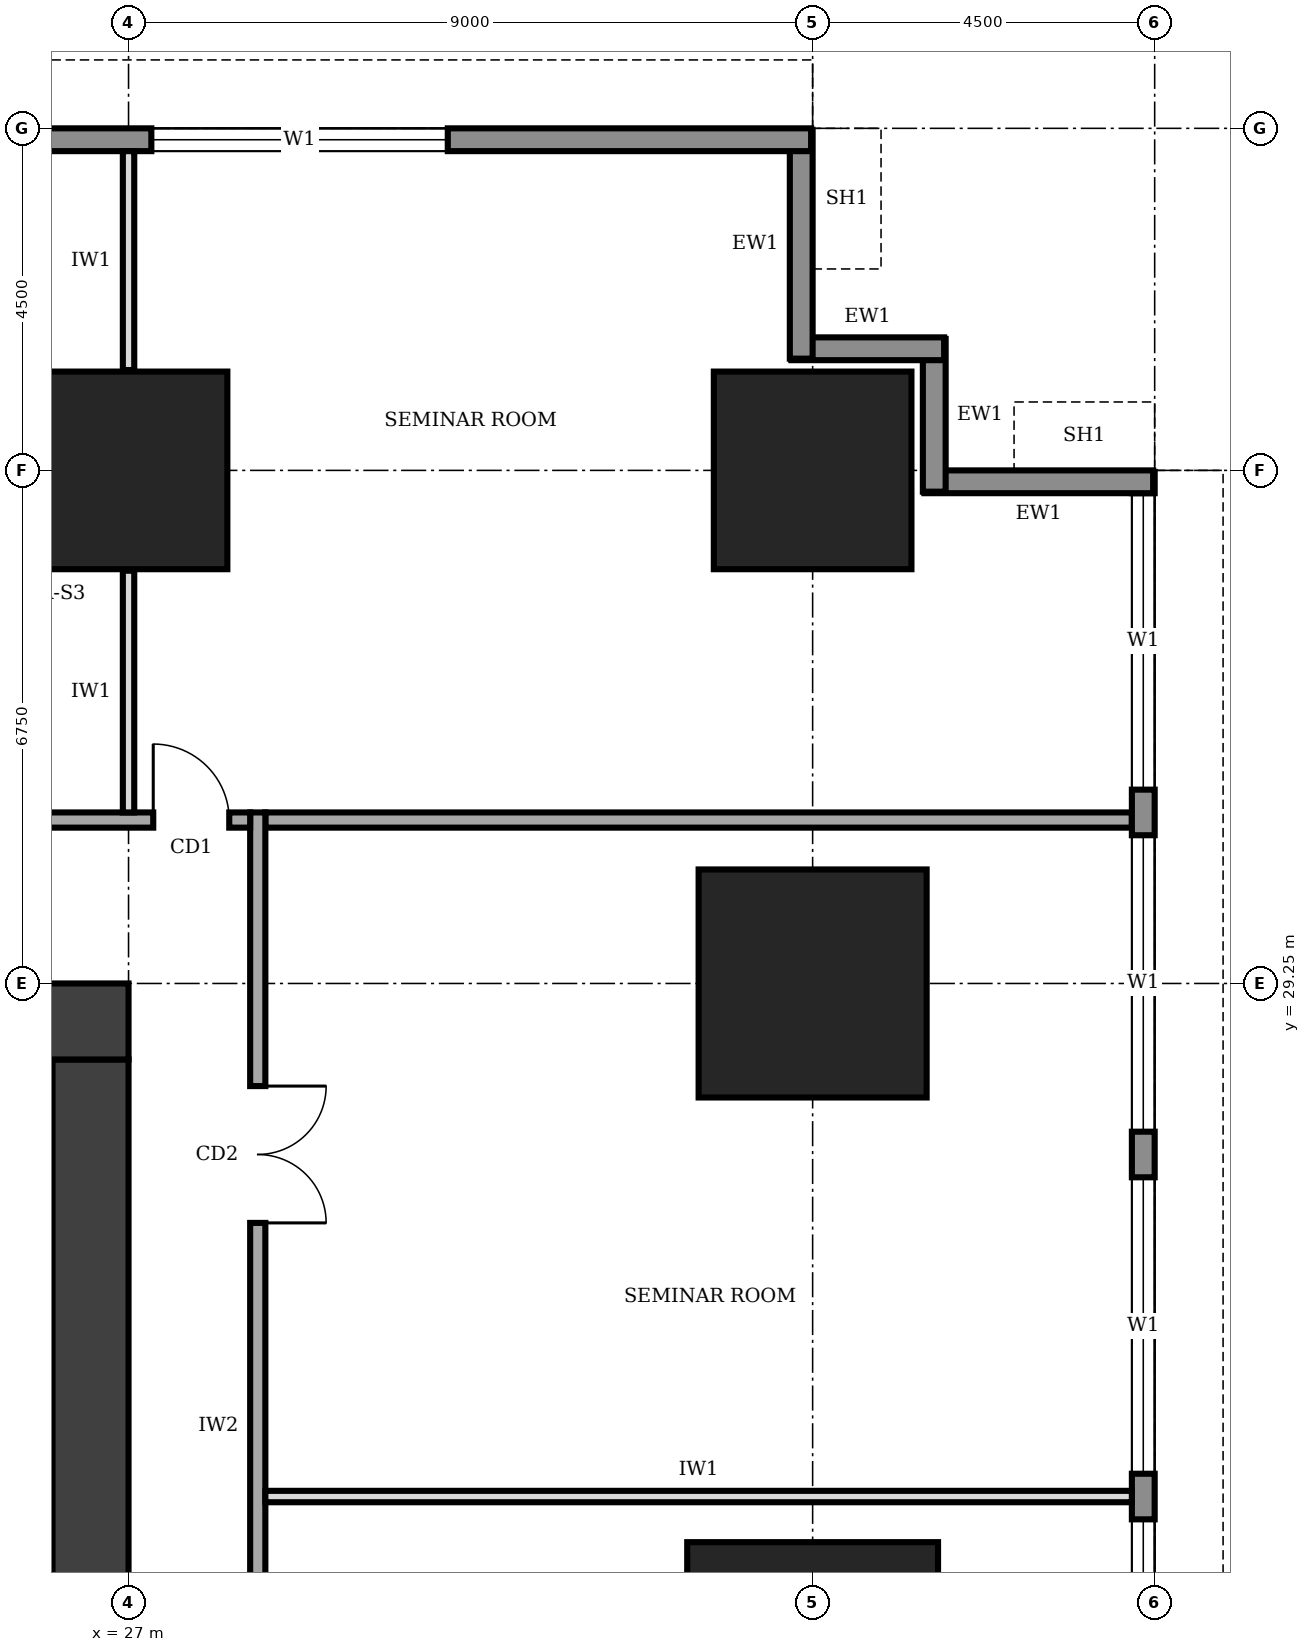
"""IFC4 building model, lengths in metres.
Left out: names, types, materials, properties, quantities, classifications, styles, units other than length and angle.
Written with IfcOpenShell. Run it as: python <this file> out.ifc"""

import sys

from ifc_helpers import new_model, si_unit, direction, frame, frame_2d, origin, origin_2d, place, context, subcontext, project, spatial, rectangle, extrude, element, fill, save


model = new_model("IFC4")
c1 = context("Model", 3, precision=1e-05, world=origin(), true_north=direction((0.0, 1.0)))
c2 = subcontext(c1, "Body", "Model", "MODEL_VIEW")
j1 = project(units=[si_unit("LENGTHUNIT", "METRE"), si_unit("PLANEANGLEUNIT", "RADIAN")], contexts=[c1])
p1 = place(None, origin())
s1 = spatial("IfcSite", under=j1, at=p1, CompositionType="ELEMENT")
p2 = place(p1, origin())
s2 = spatial("IfcBuilding", under=s1, at=p2, CompositionType="ELEMENT")
p3 = place(p2, frame((0.0, 0.0, 29.0)))
s3 = spatial("IfcBuildingStorey", under=s2, at=p3, CompositionType="ELEMENT", Elevation=29.0)
p4 = place(p3, frame((26.5, 12.25, 0.0), z_axis=(0.0, 0.0, 1.0), x_axis=(0.0, 1.0, 0.0)))
e1 = element("IfcWall", 1, at=p4, inside=s3, PredefinedType="SHEAR", context=c2, shape_type="SweptSolid", body=[
    extrude(rectangle(XDim=16.0, YDim=1.0, at=frame_2d((8.0, 0.0))), origin(), (0.0, 0.0, 1.0), 4.0),
])
p5 = place(p3, frame((27.0, 28.75, 0.0), z_axis=(0.0, 0.0, 1.0), x_axis=(-1.0, 0.0, 0.0)))
e2 = element("IfcWall", 2, at=p5, inside=s3, PredefinedType="SHEAR", context=c2, shape_type="SweptSolid", body=[
    extrude(rectangle(XDim=13.5, YDim=1.0, at=frame_2d((6.75, 0.0))), origin(), (0.0, 0.0, 1.0), 4.0),
])
p6 = place(p5, frame((4.75, 0.0, 0.0)))
e3 = element("IfcOpeningElement", 3, at=p6, cuts=e2, PredefinedType="OPENING", context=c2, shape_type="SweptSolid", body=[
    extrude(rectangle(XDim=1.8, YDim=2.1, at=frame_2d((0.9, 1.05))), frame((0.0, 0.51, 0.0), z_axis=(0.0, -1.0, 0.0), x_axis=(1.0, 0.0, 0.0)), (0.0, 0.0, 1.0), 1.02),
])
p7 = place(p3, frame((36.0, 20.25, 0.0), z_axis=(0.0, 0.0, 1.0), x_axis=(1.0, 0.0, 0.0)))
e4 = element("IfcColumn", 4, at=p7, inside=s3, PredefinedType="COLUMN", context=c2, shape_type="SweptSolid", body=[
    extrude(rectangle(XDim=3.3, YDim=3.3, at=origin_2d()), origin(), (0.0, 0.0, 1.0), 4.0),
])
p8 = place(p3, frame((36.0, 29.25, 0.0), z_axis=(0.0, 0.0, 1.0), x_axis=(1.0, 0.0, 0.0)))
e5 = element("IfcColumn", 5, at=p8, inside=s3, PredefinedType="COLUMN", context=c2, shape_type="SweptSolid", body=[
    extrude(rectangle(XDim=3.0, YDim=3.0, at=origin_2d()), origin(), (0.0, 0.0, 1.0), 4.0),
])
for number, where, z_axis, x_axis in (
    (6, (27.0, 36.0, 0.0), (0.0, 0.0, 1.0), (1.0, 0.0, 0.0)),
    (7, (36.0, 36.0, 0.0), (0.0, 0.0, 1.0), (1.0, 0.0, 0.0)),
):
    element("IfcColumn", number, at=place(p3, frame(where, z_axis=z_axis, x_axis=x_axis)), inside=s3, PredefinedType="COLUMN", context=c2, shape_type="SweptSolid", body=[
        extrude(rectangle(XDim=2.6, YDim=2.6, at=origin_2d()), origin(), (0.0, 0.0, 1.0), 4.0),
    ])
p9 = place(p3, frame((40.35, 4.52, 0.0), z_axis=(0.0, 0.0, 1.0), x_axis=(0.0, 1.0, 0.0)))
e8 = element("IfcWall", 8, at=p9, inside=s3, PredefinedType="STANDARD", context=c2, shape_type="SweptSolid", body=[
    extrude(rectangle(XDim=31.46, YDim=0.3, at=frame_2d((15.73, 0.0))), origin(), (0.0, 0.0, 1.0), 3.75),
])
p10 = place(p9, frame((4.78, 0.0, 0.9)))
e9 = element("IfcOpeningElement", 9, at=p10, cuts=e8, PredefinedType="OPENING", context=c2, shape_type="SweptSolid", body=[
    extrude(rectangle(XDim=3.9, YDim=2.2, at=frame_2d((1.95, 1.1))), frame((0.0, 0.16, 0.0), z_axis=(0.0, -1.0, 0.0), x_axis=(1.0, 0.0, 0.0)), (0.0, 0.0, 1.0), 0.32),
])
p11 = place(p9, frame((9.28, 0.0, 0.9)))
e10 = element("IfcOpeningElement", 10, at=p11, cuts=e8, PredefinedType="OPENING", context=c2, shape_type="SweptSolid", body=[
    extrude(rectangle(XDim=3.9, YDim=2.2, at=frame_2d((1.95, 1.1))), frame((0.0, 0.16, 0.0), z_axis=(0.0, -1.0, 0.0), x_axis=(1.0, 0.0, 0.0)), (0.0, 0.0, 1.0), 0.32),
])
p12 = place(p9, frame((13.78, 0.0, 0.9)))
e11 = element("IfcOpeningElement", 11, at=p12, cuts=e8, PredefinedType="OPENING", context=c2, shape_type="SweptSolid", body=[
    extrude(rectangle(XDim=3.9, YDim=2.2, at=frame_2d((1.95, 1.1))), frame((0.0, 0.16, 0.0), z_axis=(0.0, -1.0, 0.0), x_axis=(1.0, 0.0, 0.0)), (0.0, 0.0, 1.0), 0.32),
])
p13 = place(p9, frame((18.28, 0.0, 0.9)))
e12 = element("IfcOpeningElement", 12, at=p13, cuts=e8, PredefinedType="OPENING", context=c2, shape_type="SweptSolid", body=[
    extrude(rectangle(XDim=3.9, YDim=2.2, at=frame_2d((1.95, 1.1))), frame((0.0, 0.16, 0.0), z_axis=(0.0, -1.0, 0.0), x_axis=(1.0, 0.0, 0.0)), (0.0, 0.0, 1.0), 0.32),
])
p14 = place(p9, frame((22.78, 0.0, 0.9)))
e13 = element("IfcOpeningElement", 13, at=p14, cuts=e8, PredefinedType="OPENING", context=c2, shape_type="SweptSolid", body=[
    extrude(rectangle(XDim=3.9, YDim=2.2, at=frame_2d((1.95, 1.1))), frame((0.0, 0.16, 0.0), z_axis=(0.0, -1.0, 0.0), x_axis=(1.0, 0.0, 0.0)), (0.0, 0.0, 1.0), 0.32),
])
p15 = place(p9, frame((27.28, 0.0, 0.9)))
e14 = element("IfcOpeningElement", 14, at=p15, cuts=e8, PredefinedType="OPENING", context=c2, shape_type="SweptSolid", body=[
    extrude(rectangle(XDim=3.9, YDim=2.2, at=frame_2d((1.95, 1.1))), frame((0.0, 0.16, 0.0), z_axis=(0.0, -1.0, 0.0), x_axis=(1.0, 0.0, 0.0)), (0.0, 0.0, 1.0), 0.32),
])
p16 = place(p3, frame((40.48, 35.85, 0.0), z_axis=(0.0, 0.0, 1.0), x_axis=(-1.0, 0.0, 0.0)))
e15 = element("IfcWall", 15, at=p16, inside=s3, PredefinedType="STANDARD", context=c2, shape_type="SweptSolid", body=[
    extrude(rectangle(XDim=3.01, YDim=0.3, at=frame_2d((1.505, 0.0))), origin(), (0.0, 0.0, 1.0), 2.85),
])
for number, where, z_axis, x_axis in (
    (16, (37.6, 35.72, 0.0), (0.0, 0.0, 1.0), (0.0, 1.0, 0.0)),
    (17, (37.73, 37.6, 0.0), (0.0, 0.0, 1.0), (-1.0, 0.0, 0.0)),
):
    element("IfcWall", number, at=place(p3, frame(where, z_axis=z_axis, x_axis=x_axis)), inside=s3, PredefinedType="STANDARD", context=c2, shape_type="SweptSolid", body=[
        extrude(rectangle(XDim=2.01, YDim=0.3, at=frame_2d((1.005, 0.0))), origin(), (0.0, 0.0, 1.0), 3.75),
    ])
p17 = place(p3, frame((35.85, 37.47, 0.0), z_axis=(0.0, 0.0, 1.0), x_axis=(0.0, 1.0, 0.0)))
e18 = element("IfcWall", 18, at=p17, inside=s3, PredefinedType="STANDARD", context=c2, shape_type="SweptSolid", body=[
    extrude(rectangle(XDim=3.01, YDim=0.3, at=frame_2d((1.505, 0.0))), origin(), (0.0, 0.0, 1.0), 2.85),
])
p18 = place(p3, frame((35.98, 40.35, 0.0), z_axis=(0.0, 0.0, 1.0), x_axis=(-1.0, 0.0, 0.0)))
e19 = element("IfcWall", 19, at=p18, inside=s3, PredefinedType="STANDARD", context=c2, shape_type="SweptSolid", body=[
    extrude(rectangle(XDim=31.46, YDim=0.3, at=frame_2d((15.73, 0.0))), origin(), (0.0, 0.0, 1.0), 3.75),
])
p19 = place(p18, frame((27.28, 0.0, 0.9)))
e20 = element("IfcOpeningElement", 20, at=p19, cuts=e19, PredefinedType="OPENING", context=c2, shape_type="SweptSolid", body=[
    extrude(rectangle(XDim=3.9, YDim=2.2, at=frame_2d((1.95, 1.1))), frame((0.0, 0.16, 0.0), z_axis=(0.0, -1.0, 0.0), x_axis=(1.0, 0.0, 0.0)), (0.0, 0.0, 1.0), 0.32),
])
p20 = place(p18, frame((22.78, 0.0, 0.9)))
e21 = element("IfcOpeningElement", 21, at=p20, cuts=e19, PredefinedType="OPENING", context=c2, shape_type="SweptSolid", body=[
    extrude(rectangle(XDim=3.9, YDim=2.2, at=frame_2d((1.95, 1.1))), frame((0.0, 0.16, 0.0), z_axis=(0.0, -1.0, 0.0), x_axis=(1.0, 0.0, 0.0)), (0.0, 0.0, 1.0), 0.32),
])
p21 = place(p18, frame((4.78, 0.0, 0.9)))
e22 = element("IfcOpeningElement", 22, at=p21, cuts=e19, PredefinedType="OPENING", context=c2, shape_type="SweptSolid", body=[
    extrude(rectangle(XDim=3.9, YDim=2.2, at=frame_2d((1.95, 1.1))), frame((0.0, 0.16, 0.0), z_axis=(0.0, -1.0, 0.0), x_axis=(1.0, 0.0, 0.0)), (0.0, 0.0, 1.0), 0.32),
])
p22 = place(p3, frame((28.7, 7.7, 0.0), z_axis=(0.0, 0.0, 1.0), x_axis=(0.0, 1.0, 0.0)))
e23 = element("IfcWall", 23, at=p22, inside=s3, PredefinedType="SOLIDWALL", context=c2, shape_type="SweptSolid", body=[
    extrude(rectangle(XDim=23.8, YDim=0.2, at=frame_2d((11.9, 0.0))), origin(), (0.0, 0.0, 1.0), 3.75),
])
p23 = place(p22, frame((2.3, 0.0, 0.0)))
e24 = element("IfcOpeningElement", 24, at=p23, cuts=e23, PredefinedType="OPENING", context=c2, shape_type="SweptSolid", body=[
    extrude(rectangle(XDim=1.0, YDim=2.1, at=frame_2d((0.5, 1.05))), frame((0.0, 0.11, 0.0), z_axis=(0.0, -1.0, 0.0), x_axis=(1.0, 0.0, 0.0)), (0.0, 0.0, 1.0), 0.22),
])
p24 = place(p22, frame((7.55, 0.0, 0.0)))
e25 = element("IfcOpeningElement", 25, at=p24, cuts=e23, PredefinedType="OPENING", context=c2, shape_type="SweptSolid", body=[
    extrude(rectangle(XDim=1.0, YDim=2.1, at=frame_2d((0.5, 1.05))), frame((0.0, 0.11, 0.0), z_axis=(0.0, -1.0, 0.0), x_axis=(1.0, 0.0, 0.0)), (0.0, 0.0, 1.0), 0.22),
])
p25 = place(p22, frame((12.05, 0.0, 0.0)))
e26 = element("IfcOpeningElement", 26, at=p25, cuts=e23, PredefinedType="OPENING", context=c2, shape_type="SweptSolid", body=[
    extrude(rectangle(XDim=1.0, YDim=2.1, at=frame_2d((0.5, 1.05))), frame((0.0, 0.11, 0.0), z_axis=(0.0, -1.0, 0.0), x_axis=(1.0, 0.0, 0.0)), (0.0, 0.0, 1.0), 0.22),
])
p26 = place(p22, frame((18.4, 0.0, 0.0)))
e27 = element("IfcOpeningElement", 27, at=p26, cuts=e23, PredefinedType="OPENING", context=c2, shape_type="SweptSolid", body=[
    extrude(rectangle(XDim=1.8, YDim=2.1, at=frame_2d((0.9, 1.05))), frame((0.0, 0.11, 0.0), z_axis=(0.0, -1.0, 0.0), x_axis=(1.0, 0.0, 0.0)), (0.0, 0.0, 1.0), 0.22),
])
p27 = place(p3, frame((28.6, 31.4, 0.0), z_axis=(0.0, 0.0, 1.0), x_axis=(-1.0, 0.0, 0.0)))
e28 = element("IfcWall", 28, at=p27, inside=s3, PredefinedType="SOLIDWALL", context=c2, shape_type="SweptSolid", body=[
    extrude(rectangle(XDim=16.9, YDim=0.2, at=frame_2d((8.45, 0.0))), origin(), (0.0, 0.0, 1.0), 3.75),
])
p28 = place(p27, frame((15.425, 0.0, 0.0)))
e29 = element("IfcOpeningElement", 29, at=p28, cuts=e28, PredefinedType="OPENING", context=c2, shape_type="SweptSolid", body=[
    extrude(rectangle(XDim=1.0, YDim=2.1, at=frame_2d((0.5, 1.05))), frame((0.0, 0.11, 0.0), z_axis=(0.0, -1.0, 0.0), x_axis=(1.0, 0.0, 0.0)), (0.0, 0.0, 1.0), 0.22),
])
p29 = place(p27, frame((12.35, 0.0, 0.0)))
e30 = element("IfcOpeningElement", 30, at=p29, cuts=e28, PredefinedType="OPENING", context=c2, shape_type="SweptSolid", body=[
    extrude(rectangle(XDim=1.0, YDim=2.1, at=frame_2d((0.5, 1.05))), frame((0.0, 0.11, 0.0), z_axis=(0.0, -1.0, 0.0), x_axis=(1.0, 0.0, 0.0)), (0.0, 0.0, 1.0), 0.22),
])
p30 = place(p27, frame((5.6, 0.0, 0.0)))
e31 = element("IfcOpeningElement", 31, at=p30, cuts=e28, PredefinedType="OPENING", context=c2, shape_type="SweptSolid", body=[
    extrude(rectangle(XDim=1.0, YDim=2.1, at=frame_2d((0.5, 1.05))), frame((0.0, 0.11, 0.0), z_axis=(0.0, -1.0, 0.0), x_axis=(1.0, 0.0, 0.0)), (0.0, 0.0, 1.0), 0.22),
])
p31 = place(p27, frame((0.275, 0.0, 0.0)))
e32 = element("IfcOpeningElement", 32, at=p31, cuts=e28, PredefinedType="OPENING", context=c2, shape_type="SweptSolid", body=[
    extrude(rectangle(XDim=1.0, YDim=2.1, at=frame_2d((0.5, 1.05))), frame((0.0, 0.11, 0.0), z_axis=(0.0, -1.0, 0.0), x_axis=(1.0, 0.0, 0.0)), (0.0, 0.0, 1.0), 0.22),
])
p32 = place(p3, frame((28.8, 31.4, 0.0), z_axis=(0.0, 0.0, 1.0), x_axis=(1.0, 0.0, 0.0)))
e33 = element("IfcWall", 33, at=p32, inside=s3, PredefinedType="SOLIDWALL", context=c2, shape_type="SweptSolid", body=[
    extrude(rectangle(XDim=11.4, YDim=0.2, at=frame_2d((5.7, 0.0))), origin(), (0.0, 0.0, 1.0), 3.75),
])
p33 = place(p3, frame((27.0, 31.5, 0.0), z_axis=(0.0, 0.0, 1.0), x_axis=(0.0, 1.0, 0.0)))
e34 = element("IfcWall", 34, at=p33, inside=s3, PredefinedType="PARTITIONING", context=c2, shape_type="SweptSolid", body=[
    extrude(rectangle(XDim=3.18, YDim=0.15, at=frame_2d((1.59, 0.0))), origin(), (0.0, 0.0, 1.0), 2.85),
])
p34 = place(p3, frame((27.0, 37.32, 0.0), z_axis=(0.0, 0.0, 1.0), x_axis=(0.0, 1.0, 0.0)))
e35 = element("IfcWall", 35, at=p34, inside=s3, PredefinedType="PARTITIONING", context=c2, shape_type="SweptSolid", body=[
    extrude(rectangle(XDim=2.88, YDim=0.15, at=frame_2d((1.44, 0.0))), origin(), (0.0, 0.0, 1.0), 2.85),
])
p35 = place(p3, frame((28.8, 22.5, 0.0), z_axis=(0.0, 0.0, 1.0), x_axis=(1.0, 0.0, 0.0)))
e36 = element("IfcWall", 36, at=p35, inside=s3, PredefinedType="PARTITIONING", context=c2, shape_type="SweptSolid", body=[
    extrude(rectangle(XDim=11.4, YDim=0.15, at=frame_2d((5.7, 0.0))), origin(), (0.0, 0.0, 1.0), 3.75),
])
p36 = place(p12, origin())
e37 = element("IfcWindow", 37, at=p36, inside=s3, PartitioningType="SINGLE_PANEL", PredefinedType="WINDOW", context=c2, shape_type="SweptSolid", body=[
    extrude(rectangle(XDim=3.9, YDim=2.2, at=frame_2d((1.95, 1.1))), frame((0.0, 0.03, 0.0), z_axis=(0.0, -1.0, 0.0), x_axis=(1.0, 0.0, 0.0)), (0.0, 0.0, 1.0), 0.06),
])
fill(e11, e37)
p37 = place(p13, origin())
e38 = element("IfcWindow", 38, at=p37, inside=s3, PartitioningType="SINGLE_PANEL", PredefinedType="WINDOW", context=c2, shape_type="SweptSolid", body=[
    extrude(rectangle(XDim=3.9, YDim=2.2, at=frame_2d((1.95, 1.1))), frame((0.0, 0.03, 0.0), z_axis=(0.0, -1.0, 0.0), x_axis=(1.0, 0.0, 0.0)), (0.0, 0.0, 1.0), 0.06),
])
fill(e12, e38)
p38 = place(p14, origin())
e39 = element("IfcWindow", 39, at=p38, inside=s3, PartitioningType="SINGLE_PANEL", PredefinedType="WINDOW", context=c2, shape_type="SweptSolid", body=[
    extrude(rectangle(XDim=3.9, YDim=2.2, at=frame_2d((1.95, 1.1))), frame((0.0, 0.03, 0.0), z_axis=(0.0, -1.0, 0.0), x_axis=(1.0, 0.0, 0.0)), (0.0, 0.0, 1.0), 0.06),
])
fill(e13, e39)
p39 = place(p15, origin())
e40 = element("IfcWindow", 40, at=p39, inside=s3, PartitioningType="SINGLE_PANEL", PredefinedType="WINDOW", context=c2, shape_type="SweptSolid", body=[
    extrude(rectangle(XDim=3.9, YDim=2.2, at=frame_2d((1.95, 1.1))), frame((0.0, 0.03, 0.0), z_axis=(0.0, -1.0, 0.0), x_axis=(1.0, 0.0, 0.0)), (0.0, 0.0, 1.0), 0.06),
])
fill(e14, e40)
p40 = place(p21, origin())
e41 = element("IfcWindow", 41, at=p40, inside=s3, PartitioningType="SINGLE_PANEL", PredefinedType="WINDOW", context=c2, shape_type="SweptSolid", body=[
    extrude(rectangle(XDim=3.9, YDim=2.2, at=frame_2d((1.95, 1.1))), frame((0.0, 0.03, 0.0), z_axis=(0.0, -1.0, 0.0), x_axis=(1.0, 0.0, 0.0)), (0.0, 0.0, 1.0), 0.06),
])
fill(e22, e41)
p41 = place(p26, frame((1.8, 0.0, 0.0), z_axis=(0.0, 0.0, 1.0), x_axis=(-1.0, 0.0, 0.0)))
e42 = element("IfcDoor", 42, at=p41, inside=s3, OperationType="DOUBLE_DOOR_SINGLE_SWING", PredefinedType="DOOR", context=c2, shape_type="SweptSolid", body=[
    extrude(rectangle(XDim=1.8, YDim=2.1, at=frame_2d((0.9, 1.05))), frame((0.0, 0.025, 0.0), z_axis=(0.0, -1.0, 0.0), x_axis=(1.0, 0.0, 0.0)), (0.0, 0.0, 1.0), 0.05),
])
fill(e27, e42)
p42 = place(p31, frame((1.0, 0.0, 0.0), z_axis=(0.0, 0.0, 1.0), x_axis=(-1.0, 0.0, 0.0)))
e43 = element("IfcDoor", 43, at=p42, inside=s3, OperationType="SINGLE_SWING_LEFT", PredefinedType="DOOR", context=c2, shape_type="SweptSolid", body=[
    extrude(rectangle(XDim=1.0, YDim=2.1, at=frame_2d((0.5, 1.05))), frame((0.0, 0.025, 0.0), z_axis=(0.0, -1.0, 0.0), x_axis=(1.0, 0.0, 0.0)), (0.0, 0.0, 1.0), 0.05),
])
fill(e32, e43)
save(model, sys.argv[1])
